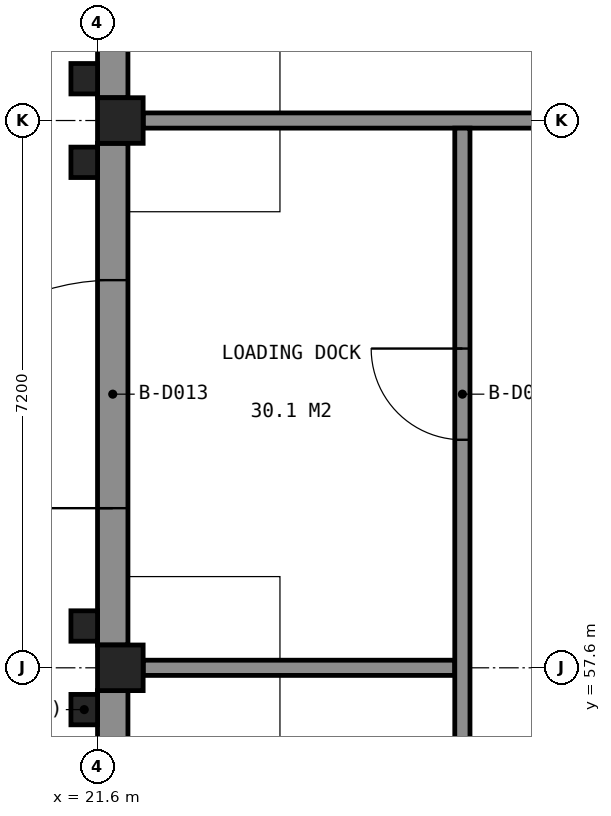
"""IFC4 building model, lengths in metres.
Left out: names, types, materials, properties, quantities, classifications, styles, units other than length and angle.
Written with IfcOpenShell. Run it as: python <this file> out.ifc"""

import sys

from ifc_helpers import new_model, si_unit, direction, frame, frame_2d, origin, origin_2d, place, context, subcontext, project, spatial, rectangle, extrude, element, fill, save


model = new_model("IFC4")
c1 = context("Model", 3, precision=1e-05, world=origin(), true_north=direction((0.0, 1.0)))
c2 = subcontext(c1, "Body", "Model", "MODEL_VIEW")
j1 = project(units=[si_unit("LENGTHUNIT", "METRE"), si_unit("PLANEANGLEUNIT", "RADIAN")], contexts=[c1])
p1 = place(None, origin())
s1 = spatial("IfcSite", under=j1, at=p1, CompositionType="ELEMENT")
p2 = place(p1, origin())
s2 = spatial("IfcBuilding", under=s1, at=p2, CompositionType="ELEMENT")
p3 = place(p2, origin())
s3 = spatial("IfcBuildingStorey", under=s2, at=p3, CompositionType="ELEMENT", Elevation=0.0)
for number, where, z_axis, x_axis in (
    (1, (21.9, 57.6, 0.0), (0.0, 0.0, 1.0), (1.0, 0.0, 0.0)),
    (2, (21.9, 64.8, 0.0), (0.0, 0.0, 1.0), (1.0, 0.0, 0.0)),
):
    element("IfcColumn", number, at=place(p3, frame(where, z_axis=z_axis, x_axis=x_axis)), inside=s3, PredefinedType="COLUMN", context=c2, shape_type="SweptSolid", body=[
        extrude(rectangle(XDim=0.6, YDim=0.6, at=origin_2d()), origin(), (0.0, 0.0, 1.0), 4.8),
    ])
p4 = place(p3, frame((21.8, 50.7, 0.0), z_axis=(0.0, 0.0, 1.0), x_axis=(0.0, 1.0, 0.0)))
e3 = element("IfcWall", 3, at=p4, inside=s3, PredefinedType="SOLIDWALL", context=c2, shape_type="SweptSolid", body=[
    extrude(rectangle(XDim=6.6, YDim=0.4, at=frame_2d((3.3, 0.0))), origin(), (0.0, 0.0, 1.0), 3.95),
])
p5 = place(p4, frame((1.8, 0.0, 0.0)))
e4 = element("IfcOpeningElement", 4, at=p5, cuts=e3, PredefinedType="OPENING", context=c2, shape_type="SweptSolid", body=[
    extrude(rectangle(XDim=3.0, YDim=3.0, at=frame_2d((1.5, 1.5))), frame((0.0, 0.21, 0.0), z_axis=(0.0, -1.0, 0.0), x_axis=(1.0, 0.0, 0.0)), (0.0, 0.0, 1.0), 0.42),
])
p6 = place(p3, frame((21.8, 57.9, 0.0), z_axis=(0.0, 0.0, 1.0), x_axis=(0.0, 1.0, 0.0)))
e5 = element("IfcWall", 5, at=p6, inside=s3, PredefinedType="SOLIDWALL", context=c2, shape_type="SweptSolid", body=[
    extrude(rectangle(XDim=6.6, YDim=0.4, at=frame_2d((3.3, 0.0))), origin(), (0.0, 0.0, 1.0), 3.95),
])
p7 = place(p6, frame((1.8, 0.0, 0.0)))
e6 = element("IfcOpeningElement", 6, at=p7, cuts=e5, PredefinedType="OPENING", context=c2, shape_type="SweptSolid", body=[
    extrude(rectangle(XDim=3.0, YDim=3.0, at=frame_2d((1.5, 1.5))), frame((0.0, 0.21, 0.0), z_axis=(0.0, -1.0, 0.0), x_axis=(1.0, 0.0, 0.0)), (0.0, 0.0, 1.0), 0.42),
])
p8 = place(p3, frame((21.8, 65.1, 0.0), z_axis=(0.0, 0.0, 1.0), x_axis=(0.0, 1.0, 0.0)))
e7 = element("IfcWall", 7, at=p8, inside=s3, PredefinedType="SOLIDWALL", context=c2, shape_type="SweptSolid", body=[
    extrude(rectangle(XDim=6.3, YDim=0.4, at=frame_2d((3.15, 0.0))), origin(), (0.0, 0.0, 1.0), 3.95),
])
p9 = place(p8, frame((2.55, 0.0, 0.0)))
e8 = element("IfcOpeningElement", 8, at=p9, cuts=e7, PredefinedType="OPENING", context=c2, shape_type="SweptSolid", body=[
    extrude(rectangle(XDim=1.2, YDim=2.1, at=frame_2d((0.6, 1.05))), frame((0.0, 0.21, 0.0), z_axis=(0.0, -1.0, 0.0), x_axis=(1.0, 0.0, 0.0)), (0.0, 0.0, 1.0), 0.42),
])
p10 = place(p8, frame((0.75, 0.0, 2.0)))
e9 = element("IfcOpeningElement", 9, at=p10, cuts=e7, PredefinedType="OPENING", context=c2, shape_type="SweptSolid", body=[
    extrude(rectangle(XDim=1.2, YDim=1.5, at=frame_2d((0.6, 0.75))), frame((0.0, 0.21, 0.0), z_axis=(0.0, -1.0, 0.0), x_axis=(1.0, 0.0, 0.0)), (0.0, 0.0, 1.0), 0.42),
])
p11 = place(p8, frame((4.35, 0.0, 2.0)))
e10 = element("IfcOpeningElement", 10, at=p11, cuts=e7, PredefinedType="OPENING", context=c2, shape_type="SweptSolid", body=[
    extrude(rectangle(XDim=1.2, YDim=1.5, at=frame_2d((0.6, 0.75))), frame((0.0, 0.21, 0.0), z_axis=(0.0, -1.0, 0.0), x_axis=(1.0, 0.0, 0.0)), (0.0, 0.0, 1.0), 0.42),
])
for number, where, z_axis, x_axis in (
    (11, (21.425, 57.05, -0.25), (0.0, 0.0, 1.0), (1.0, 0.0, 0.0)),
    (12, (21.425, 58.15, -0.25), (0.0, 0.0, 1.0), (1.0, 0.0, 0.0)),
    (13, (21.425, 64.25, -0.25), (0.0, 0.0, 1.0), (1.0, 0.0, 0.0)),
    (14, (21.425, 65.35, -0.25), (0.0, 0.0, 1.0), (1.0, 0.0, 0.0)),
):
    element("IfcColumn", number, at=place(p3, frame(where, z_axis=z_axis, x_axis=x_axis)), inside=s3, PredefinedType="COLUMN", context=c2, shape_type="SweptSolid", body=[
        extrude(rectangle(XDim=0.35, YDim=0.4, at=origin_2d()), origin(), (0.0, 0.0, 1.0), 5.05),
    ])
p12 = place(p3, frame((21.54, 55.6, 0.0), z_axis=(0.0, 0.0, 1.0), x_axis=(0.0, 1.0, 0.0)))
e15 = element("IfcWall", 15, at=p12, inside=s3, PredefinedType="SOLIDWALL", context=c2, shape_type="SweptSolid", body=[
    extrude(rectangle(XDim=1.25, YDim=0.12, at=frame_2d((0.625, 0.0))), origin(), (0.0, 0.0, 1.0), 0.6),
])
p13 = place(p3, frame((21.54, 57.25, 0.0), z_axis=(0.0, 0.0, 1.0), x_axis=(0.0, 1.0, 0.0)))
e16 = element("IfcWall", 16, at=p13, inside=s3, PredefinedType="SOLIDWALL", context=c2, shape_type="SweptSolid", body=[
    extrude(rectangle(XDim=0.7, YDim=0.12, at=frame_2d((0.35, 0.0))), origin(), (0.0, 0.0, 1.0), 0.6),
])
for number, where, z_axis, x_axis in (
    (17, (21.54, 58.35, 0.0), (0.0, 0.0, 1.0), (0.0, 1.0, 0.0)),
    (18, (21.54, 62.8, 0.0), (0.0, 0.0, 1.0), (0.0, 1.0, 0.0)),
):
    element("IfcWall", number, at=place(p3, frame(where, z_axis=z_axis, x_axis=x_axis)), inside=s3, PredefinedType="SOLIDWALL", context=c2, shape_type="SweptSolid", body=[
        extrude(rectangle(XDim=1.25, YDim=0.12, at=frame_2d((0.625, 0.0))), origin(), (0.0, 0.0, 1.0), 0.6),
    ])
p14 = place(p3, frame((21.54, 64.45, 0.0), z_axis=(0.0, 0.0, 1.0), x_axis=(0.0, 1.0, 0.0)))
e19 = element("IfcWall", 19, at=p14, inside=s3, PredefinedType="SOLIDWALL", context=c2, shape_type="SweptSolid", body=[
    extrude(rectangle(XDim=0.7, YDim=0.12, at=frame_2d((0.35, 0.0))), origin(), (0.0, 0.0, 1.0), 0.6),
])
p15 = place(p3, frame((21.54, 65.55, 0.0), z_axis=(0.0, 0.0, 1.0), x_axis=(0.0, 1.0, 0.0)))
e20 = element("IfcWall", 20, at=p15, inside=s3, PredefinedType="SOLIDWALL", context=c2, shape_type="SweptSolid", body=[
    extrude(rectangle(XDim=2.0, YDim=0.12, at=frame_2d((1.0, 0.0))), origin(), (0.0, 0.0, 1.0), 0.6),
])
p16 = place(p3, frame((22.2, 57.6, 0.0), z_axis=(0.0, 0.0, 1.0), x_axis=(1.0, 0.0, 0.0)))
e21 = element("IfcWall", 21, at=p16, inside=s3, PredefinedType="PARTITIONING", context=c2, shape_type="SweptSolid", body=[
    extrude(rectangle(XDim=4.1, YDim=0.2, at=frame_2d((2.05, 0.0))), origin(), (0.0, 0.0, 1.0), 3.95),
])
p17 = place(p3, frame((22.2, 64.8, 0.0), z_axis=(0.0, 0.0, 1.0), x_axis=(1.0, 0.0, 0.0)))
e22 = element("IfcWall", 22, at=p17, inside=s3, PredefinedType="PARTITIONING", context=c2, shape_type="SweptSolid", body=[
    extrude(rectangle(XDim=6.3, YDim=0.2, at=frame_2d((3.15, 0.0))), origin(), (0.0, 0.0, 1.0), 3.95),
])
p18 = place(p3, frame((26.4, 43.3, 0.0), z_axis=(0.0, 0.0, 1.0), x_axis=(0.0, 1.0, 0.0)))
e23 = element("IfcWall", 23, at=p18, inside=s3, PredefinedType="PARTITIONING", context=c2, shape_type="SweptSolid", body=[
    extrude(rectangle(XDim=21.4, YDim=0.2, at=frame_2d((10.7, 0.0))), origin(), (0.0, 0.0, 1.0), 3.95),
])
p19 = place(p18, frame((2.9, 0.0, 0.0)))
e24 = element("IfcOpeningElement", 24, at=p19, cuts=e23, PredefinedType="OPENING", context=c2, shape_type="SweptSolid", body=[
    extrude(rectangle(XDim=1.2, YDim=2.1, at=frame_2d((0.6, 1.05))), frame((0.0, 0.11, 0.0), z_axis=(0.0, -1.0, 0.0), x_axis=(1.0, 0.0, 0.0)), (0.0, 0.0, 1.0), 0.22),
])
p20 = place(p18, frame((10.1, 0.0, 0.0)))
e25 = element("IfcOpeningElement", 25, at=p20, cuts=e23, PredefinedType="OPENING", context=c2, shape_type="SweptSolid", body=[
    extrude(rectangle(XDim=1.2, YDim=2.1, at=frame_2d((0.6, 1.05))), frame((0.0, 0.11, 0.0), z_axis=(0.0, -1.0, 0.0), x_axis=(1.0, 0.0, 0.0)), (0.0, 0.0, 1.0), 0.22),
])
p21 = place(p18, frame((17.3, 0.0, 0.0)))
e26 = element("IfcOpeningElement", 26, at=p21, cuts=e23, PredefinedType="OPENING", context=c2, shape_type="SweptSolid", body=[
    extrude(rectangle(XDim=1.2, YDim=2.1, at=frame_2d((0.6, 1.05))), frame((0.0, 0.11, 0.0), z_axis=(0.0, -1.0, 0.0), x_axis=(1.0, 0.0, 0.0)), (0.0, 0.0, 1.0), 0.22),
])
p22 = place(p7, origin())
e27 = element("IfcDoor", 27, at=p22, inside=s3, OperationType="ROLLINGUP", PredefinedType="DOOR", context=c2, shape_type="SweptSolid", body=[
    extrude(rectangle(XDim=3.0, YDim=3.0, at=frame_2d((1.5, 1.5))), frame((0.0, 0.025, 0.0), z_axis=(0.0, -1.0, 0.0), x_axis=(1.0, 0.0, 0.0)), (0.0, 0.0, 1.0), 0.05),
])
fill(e6, e27)
p23 = place(p21, origin())
e28 = element("IfcDoor", 28, at=p23, inside=s3, OperationType="SINGLE_SWING_RIGHT", PredefinedType="DOOR", context=c2, shape_type="SweptSolid", body=[
    extrude(rectangle(XDim=1.2, YDim=2.1, at=frame_2d((0.6, 1.05))), frame((0.0, 0.025, 0.0), z_axis=(0.0, -1.0, 0.0), x_axis=(1.0, 0.0, 0.0)), (0.0, 0.0, 1.0), 0.05),
])
fill(e26, e28)
save(model, sys.argv[1])
